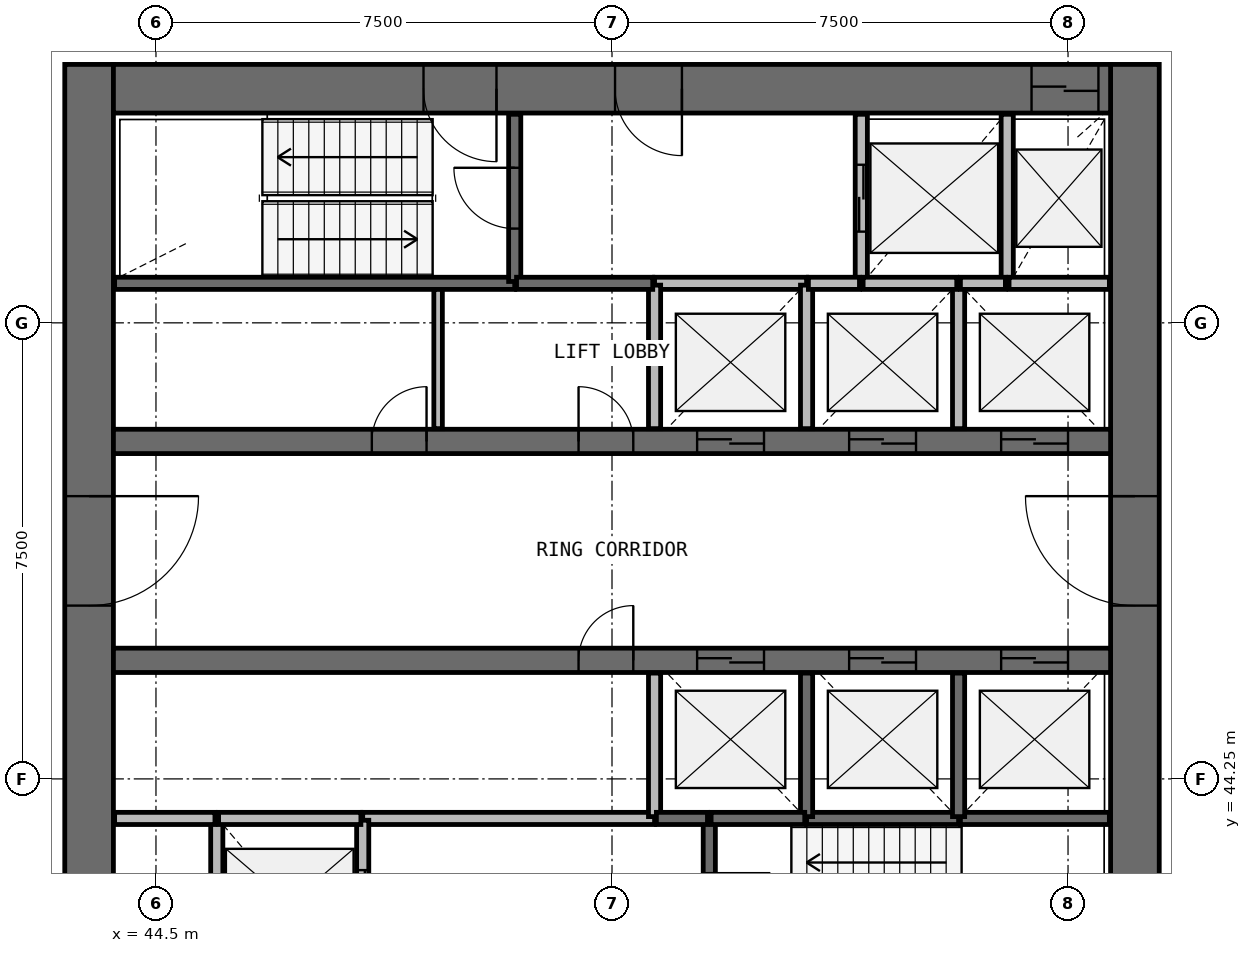
"""IFC4 building model, lengths in metres.
Left out: names, types, materials, properties, quantities, classifications, styles, units other than length and angle.
Written with IfcOpenShell. Run it as: python <this file> out.ifc"""

import sys

from ifc_helpers import new_model, si_unit, direction, frame, frame_2d, origin, place, context, subcontext, project, spatial, rectangle, extrude, source, transform, mapped, element, fill, save


model = new_model("IFC4")
c1 = context("Model", 3, precision=1e-05, world=origin(), true_north=direction((0.0, 1.0)))
c2 = subcontext(c1, "Body", "Model", "MODEL_VIEW")
j1 = project(units=[si_unit("LENGTHUNIT", "METRE"), si_unit("PLANEANGLEUNIT", "RADIAN")], contexts=[c1])
p1 = place(None, origin())
s1 = spatial("IfcSite", under=j1, at=p1, CompositionType="ELEMENT")
p2 = place(p1, origin())
s2 = spatial("IfcBuilding", under=s1, at=p2, CompositionType="ELEMENT")
p3 = place(p2, frame((0.0, 0.0, 140.9)))
s3 = spatial("IfcBuildingStorey", under=s2, at=p3, CompositionType="ELEMENT", Elevation=140.9)
p4 = place(p3, frame((60.6, 40.0, 0.0), z_axis=(0.0, 0.0, 1.0), x_axis=(0.0, 1.0, 0.0)))
e1 = element("IfcWall", 1, at=p4, inside=s3, PredefinedType="SHEAR", context=c2, shape_type="SweptSolid", body=[
    extrude(rectangle(XDim=16.0, YDim=0.8, at=frame_2d((8.0, 0.0))), origin(), (0.0, 0.0, 1.0), 3.9),
])
p5 = place(p4, frame((7.1, 0.0, 0.0)))
e2 = element("IfcOpeningElement", 2, at=p5, cuts=e1, PredefinedType="OPENING", context=c2, shape_type="SweptSolid", body=[
    extrude(rectangle(XDim=1.8, YDim=2.1, at=frame_2d((0.9, 1.05))), frame((0.0, 0.41, 0.0), z_axis=(0.0, -1.0, 0.0), x_axis=(1.0, 0.0, 0.0)), (0.0, 0.0, 1.0), 0.82),
])
p6 = place(p3, frame((43.4, 56.0, 0.0), z_axis=(0.0, 0.0, 1.0), x_axis=(0.0, -1.0, 0.0)))
e3 = element("IfcWall", 3, at=p6, inside=s3, PredefinedType="SHEAR", context=c2, shape_type="SweptSolid", body=[
    extrude(rectangle(XDim=16.0, YDim=0.8, at=frame_2d((8.0, 0.0))), origin(), (0.0, 0.0, 1.0), 3.9),
])
p7 = place(p6, frame((7.1, 0.0, 0.0)))
e4 = element("IfcOpeningElement", 4, at=p7, cuts=e3, PredefinedType="OPENING", context=c2, shape_type="SweptSolid", body=[
    extrude(rectangle(XDim=1.8, YDim=2.1, at=frame_2d((0.9, 1.05))), frame((0.0, 0.41, 0.0), z_axis=(0.0, -1.0, 0.0), x_axis=(1.0, 0.0, 0.0)), (0.0, 0.0, 1.0), 0.82),
])
p8 = place(p3, frame((60.2, 55.6, 0.0), z_axis=(0.0, 0.0, 1.0), x_axis=(-1.0, 0.0, 0.0)))
e5 = element("IfcWall", 5, at=p8, inside=s3, PredefinedType="SHEAR", context=c2, shape_type="SweptSolid", body=[
    extrude(rectangle(XDim=16.4, YDim=0.8, at=frame_2d((8.2, 0.0))), origin(), (0.0, 0.0, 1.0), 3.9),
])
p9 = place(p8, frame((0.2, 0.0, 0.0)))
e6 = element("IfcOpeningElement", 6, at=p9, cuts=e5, PredefinedType="OPENING", context=c2, shape_type="SweptSolid", body=[
    extrude(rectangle(XDim=1.1, YDim=2.1, at=frame_2d((0.55, 1.05))), frame((0.0, 0.41, 0.0), z_axis=(0.0, -1.0, 0.0), x_axis=(1.0, 0.0, 0.0)), (0.0, 0.0, 1.0), 0.82),
])
p10 = place(p8, frame((10.1, 0.0, 0.0)))
e7 = element("IfcOpeningElement", 7, at=p10, cuts=e5, PredefinedType="OPENING", context=c2, shape_type="SweptSolid", body=[
    extrude(rectangle(XDim=1.2, YDim=2.1, at=frame_2d((0.6, 1.05))), frame((0.0, 0.41, 0.0), z_axis=(0.0, -1.0, 0.0), x_axis=(1.0, 0.0, 0.0)), (0.0, 0.0, 1.0), 0.82),
])
p11 = place(p8, frame((7.05, 0.0, 0.0)))
e8 = element("IfcOpeningElement", 8, at=p11, cuts=e5, PredefinedType="OPENING", context=c2, shape_type="SweptSolid", body=[
    extrude(rectangle(XDim=1.1, YDim=2.1, at=frame_2d((0.55, 1.05))), frame((0.0, 0.41, 0.0), z_axis=(0.0, -1.0, 0.0), x_axis=(1.0, 0.0, 0.0)), (0.0, 0.0, 1.0), 0.82),
])
p12 = place(p3, frame((43.8, 49.8, 0.0), z_axis=(0.0, 0.0, 1.0), x_axis=(1.0, 0.0, 0.0)))
e9 = element("IfcWall", 9, at=p12, inside=s3, PredefinedType="SHEAR", context=c2, shape_type="SweptSolid", body=[
    extrude(rectangle(XDim=16.4, YDim=0.4, at=frame_2d((8.2, 0.0))), origin(), (0.0, 0.0, 1.0), 3.9),
])
p13 = place(p12, frame((9.6, 0.0, 0.0)))
e10 = element("IfcOpeningElement", 10, at=p13, cuts=e9, PredefinedType="OPENING", context=c2, shape_type="SweptSolid", body=[
    extrude(rectangle(XDim=1.1, YDim=2.1, at=frame_2d((0.55, 1.05))), frame((0.0, 0.21, 0.0), z_axis=(0.0, -1.0, 0.0), x_axis=(1.0, 0.0, 0.0)), (0.0, 0.0, 1.0), 0.42),
])
p14 = place(p12, frame((12.1, 0.0, 0.0)))
e11 = element("IfcOpeningElement", 11, at=p14, cuts=e9, PredefinedType="OPENING", context=c2, shape_type="SweptSolid", body=[
    extrude(rectangle(XDim=1.1, YDim=2.1, at=frame_2d((0.55, 1.05))), frame((0.0, 0.21, 0.0), z_axis=(0.0, -1.0, 0.0), x_axis=(1.0, 0.0, 0.0)), (0.0, 0.0, 1.0), 0.42),
])
p15 = place(p12, frame((14.6, 0.0, 0.0)))
e12 = element("IfcOpeningElement", 12, at=p15, cuts=e9, PredefinedType="OPENING", context=c2, shape_type="SweptSolid", body=[
    extrude(rectangle(XDim=1.1, YDim=2.1, at=frame_2d((0.55, 1.05))), frame((0.0, 0.21, 0.0), z_axis=(0.0, -1.0, 0.0), x_axis=(1.0, 0.0, 0.0)), (0.0, 0.0, 1.0), 0.42),
])
p16 = place(p12, frame((4.25, 0.0, 0.0)))
e13 = element("IfcOpeningElement", 13, at=p16, cuts=e9, PredefinedType="OPENING", context=c2, shape_type="SweptSolid", body=[
    extrude(rectangle(XDim=0.9, YDim=2.1, at=frame_2d((0.45, 1.05))), frame((0.0, 0.21, 0.0), z_axis=(0.0, -1.0, 0.0), x_axis=(1.0, 0.0, 0.0)), (0.0, 0.0, 1.0), 0.42),
])
p17 = place(p12, frame((7.65, 0.0, 0.0)))
e14 = element("IfcOpeningElement", 14, at=p17, cuts=e9, PredefinedType="OPENING", context=c2, shape_type="SweptSolid", body=[
    extrude(rectangle(XDim=0.9, YDim=2.1, at=frame_2d((0.45, 1.05))), frame((0.0, 0.21, 0.0), z_axis=(0.0, -1.0, 0.0), x_axis=(1.0, 0.0, 0.0)), (0.0, 0.0, 1.0), 0.42),
])
p18 = place(p3, frame((43.8, 46.2, 0.0), z_axis=(0.0, 0.0, 1.0), x_axis=(1.0, 0.0, 0.0)))
e15 = element("IfcWall", 15, at=p18, inside=s3, PredefinedType="SHEAR", context=c2, shape_type="SweptSolid", body=[
    extrude(rectangle(XDim=16.4, YDim=0.4, at=frame_2d((8.2, 0.0))), origin(), (0.0, 0.0, 1.0), 3.9),
])
p19 = place(p18, frame((9.6, 0.0, 0.0)))
e16 = element("IfcOpeningElement", 16, at=p19, cuts=e15, PredefinedType="OPENING", context=c2, shape_type="SweptSolid", body=[
    extrude(rectangle(XDim=1.1, YDim=2.1, at=frame_2d((0.55, 1.05))), frame((0.0, 0.21, 0.0), z_axis=(0.0, -1.0, 0.0), x_axis=(1.0, 0.0, 0.0)), (0.0, 0.0, 1.0), 0.42),
])
p20 = place(p18, frame((12.1, 0.0, 0.0)))
e17 = element("IfcOpeningElement", 17, at=p20, cuts=e15, PredefinedType="OPENING", context=c2, shape_type="SweptSolid", body=[
    extrude(rectangle(XDim=1.1, YDim=2.1, at=frame_2d((0.55, 1.05))), frame((0.0, 0.21, 0.0), z_axis=(0.0, -1.0, 0.0), x_axis=(1.0, 0.0, 0.0)), (0.0, 0.0, 1.0), 0.42),
])
p21 = place(p18, frame((14.6, 0.0, 0.0)))
e18 = element("IfcOpeningElement", 18, at=p21, cuts=e15, PredefinedType="OPENING", context=c2, shape_type="SweptSolid", body=[
    extrude(rectangle(XDim=1.1, YDim=2.1, at=frame_2d((0.55, 1.05))), frame((0.0, 0.21, 0.0), z_axis=(0.0, -1.0, 0.0), x_axis=(1.0, 0.0, 0.0)), (0.0, 0.0, 1.0), 0.42),
])
p22 = place(p18, frame((7.65, 0.0, 0.0)))
e19 = element("IfcOpeningElement", 19, at=p22, cuts=e15, PredefinedType="OPENING", context=c2, shape_type="SweptSolid", body=[
    extrude(rectangle(XDim=0.9, YDim=2.1, at=frame_2d((0.45, 1.05))), frame((0.0, 0.21, 0.0), z_axis=(0.0, -1.0, 0.0), x_axis=(1.0, 0.0, 0.0)), (0.0, 0.0, 1.0), 0.42),
])
p23 = place(p3, frame((43.82, 52.4, 0.0), z_axis=(0.0, 0.0, 1.0), x_axis=(1.0, 0.0, 0.0)))
e20 = element("IfcWall", 20, at=p23, inside=s3, PredefinedType="SOLIDWALL", context=c2, shape_type="SweptSolid", body=[
    extrude(rectangle(XDim=6.58, YDim=0.2, at=frame_2d((3.29, 0.0))), origin(), (0.0, 0.0, 1.0), 3.58),
])
p24 = place(p3, frame((52.7, 43.6, 0.0), z_axis=(0.0, 0.0, 1.0), x_axis=(-1.0, 0.0, 0.0)))
e21 = element("IfcWall", 21, at=p24, inside=s3, PredefinedType="SOLIDWALL", context=c2, shape_type="SweptSolid", body=[
    extrude(rectangle(XDim=4.8, YDim=0.2, at=frame_2d((2.4, 0.0))), origin(), (0.0, 0.0, 1.0), 3.58),
])
p25 = place(p3, frame((45.5, 43.6, 0.0), z_axis=(0.0, 0.0, 1.0), x_axis=(0.0, -1.0, 0.0)))
e22 = element("IfcWall", 22, at=p25, inside=s3, PredefinedType="SOLIDWALL", context=c2, shape_type="SweptSolid", body=[
    extrude(rectangle(XDim=2.78, YDim=0.2, at=frame_2d((1.39, 0.0))), origin(), (0.0, 0.0, 1.0), 3.58),
])
p26 = place(p3, frame((47.9, 40.82, 0.0), z_axis=(0.0, 0.0, 1.0), x_axis=(0.0, 1.0, 0.0)))
e23 = element("IfcWall", 23, at=p26, inside=s3, PredefinedType="SOLIDWALL", context=c2, shape_type="SweptSolid", body=[
    extrude(rectangle(XDim=2.75, YDim=0.2, at=frame_2d((1.375, 0.0))), origin(), (0.0, 0.0, 1.0), 3.58),
])
p27 = place(p26, frame((0.83, 0.0, 0.0)))
e24 = element("IfcOpeningElement", 24, at=p27, cuts=e23, PredefinedType="OPENING", context=c2, shape_type="SweptSolid", body=[
    extrude(rectangle(XDim=1.1, YDim=2.1, at=frame_2d((0.55, 1.05))), frame((0.0, 0.11, 0.0), z_axis=(0.0, -1.0, 0.0), x_axis=(1.0, 0.0, 0.0)), (0.0, 0.0, 1.0), 0.22),
])
p28 = place(p3, frame((50.4, 52.43, 0.0), z_axis=(0.0, 0.0, 1.0), x_axis=(0.0, 1.0, 0.0)))
e25 = element("IfcWall", 25, at=p28, inside=s3, PredefinedType="SOLIDWALL", context=c2, shape_type="SweptSolid", body=[
    extrude(rectangle(XDim=2.75, YDim=0.2, at=frame_2d((1.375, 0.0))), origin(), (0.0, 0.0, 1.0), 3.58),
])
p29 = place(p28, frame((0.87, 0.0, 0.0)))
e26 = element("IfcOpeningElement", 26, at=p29, cuts=e25, PredefinedType="OPENING", context=c2, shape_type="SweptSolid", body=[
    extrude(rectangle(XDim=1.0, YDim=2.1, at=frame_2d((0.5, 1.05))), frame((0.0, 0.11, 0.0), z_axis=(0.0, -1.0, 0.0), x_axis=(1.0, 0.0, 0.0)), (0.0, 0.0, 1.0), 0.22),
])
p30 = place(p3, frame((53.6, 43.6, 0.0), z_axis=(0.0, 0.0, 1.0), x_axis=(0.0, -1.0, 0.0)))
e27 = element("IfcWall", 27, at=p30, inside=s3, PredefinedType="SOLIDWALL", context=c2, shape_type="SweptSolid", body=[
    extrude(rectangle(XDim=2.78, YDim=0.2, at=frame_2d((1.39, 0.0))), origin(), (0.0, 0.0, 1.0), 3.58),
])
p31 = place(p30, frame((0.9, 0.0, 0.0)))
e28 = element("IfcOpeningElement", 28, at=p31, cuts=e27, PredefinedType="OPENING", context=c2, shape_type="SweptSolid", body=[
    extrude(rectangle(XDim=1.0, YDim=2.1, at=frame_2d((0.5, 1.05))), frame((0.0, 0.11, 0.0), z_axis=(0.0, -1.0, 0.0), x_axis=(1.0, 0.0, 0.0)), (0.0, 0.0, 1.0), 0.22),
])
p32 = place(p3, frame((56.1, 55.18, 0.0), z_axis=(0.0, 0.0, 1.0), x_axis=(0.0, -1.0, 0.0)))
e29 = element("IfcWall", 29, at=p32, inside=s3, PredefinedType="SOLIDWALL", context=c2, shape_type="SweptSolid", body=[
    extrude(rectangle(XDim=2.78, YDim=0.2, at=frame_2d((1.39, 0.0))), origin(), (0.0, 0.0, 1.0), 3.58),
])
p33 = place(p32, frame((0.83, 0.0, 0.0)))
e30 = element("IfcOpeningElement", 30, at=p33, cuts=e29, PredefinedType="OPENING", context=c2, shape_type="SweptSolid", body=[
    extrude(rectangle(XDim=1.1, YDim=2.1, at=frame_2d((0.55, 1.05))), frame((0.0, 0.11, 0.0), z_axis=(0.0, -1.0, 0.0), x_axis=(1.0, 0.0, 0.0)), (0.0, 0.0, 1.0), 0.22),
])
p34 = place(p3, frame((58.5, 52.4, 0.0), z_axis=(0.0, 0.0, 1.0), x_axis=(0.0, 1.0, 0.0)))
e31 = element("IfcWall", 31, at=p34, inside=s3, PredefinedType="SOLIDWALL", context=c2, shape_type="SweptSolid", body=[
    extrude(rectangle(XDim=2.78, YDim=0.2, at=frame_2d((1.39, 0.0))), origin(), (0.0, 0.0, 1.0), 3.58),
])
for number, where, z_axis, x_axis in (
    (32, (55.2, 52.4, 0.0), (0.0, 0.0, 1.0), (-1.0, 0.0, 0.0)),
    (33, (55.2, 43.6, 0.0), (0.0, 0.0, 1.0), (1.0, 0.0, 0.0)),
):
    element("IfcWall", number, at=place(p3, frame(where, z_axis=z_axis, x_axis=x_axis)), inside=s3, PredefinedType="SOLIDWALL", context=c2, shape_type="SweptSolid", body=[
        extrude(rectangle(XDim=2.5, YDim=0.2, at=frame_2d((1.25, 0.0))), origin(), (0.0, 0.0, 1.0), 3.58),
    ])
p35 = place(p3, frame((57.73, 43.6, 0.0), z_axis=(0.0, 0.0, 1.0), x_axis=(1.0, 0.0, 0.0)))
e34 = element("IfcWall", 34, at=p35, inside=s3, PredefinedType="SOLIDWALL", context=c2, shape_type="SweptSolid", body=[
    extrude(rectangle(XDim=2.45, YDim=0.2, at=frame_2d((1.225, 0.0))), origin(), (0.0, 0.0, 1.0), 3.58),
])
p36 = place(p3, frame((47.87, 43.6, 0.0), z_axis=(0.0, 0.0, 1.0), x_axis=(-1.0, 0.0, 0.0)))
e35 = element("IfcWall", 35, at=p36, inside=s3, PredefinedType="SOLIDWALL", context=c2, shape_type="SweptSolid", body=[
    extrude(rectangle(XDim=2.34, YDim=0.2, at=frame_2d((1.17, 0.0))), origin(), (0.0, 0.0, 1.0), 3.58),
])
for number, where, z_axis, x_axis in (
    (36, (52.7, 45.99, 0.0), (0.0, 0.0, 1.0), (0.0, -1.0, 0.0)),
    (37, (52.7, 52.37, 0.0), (0.0, 0.0, 1.0), (0.0, -1.0, 0.0)),
    (38, (55.2, 43.63, 0.0), (0.0, 0.0, 1.0), (0.0, 1.0, 0.0)),
    (39, (55.2, 50.01, 0.0), (0.0, 0.0, 1.0), (0.0, 1.0, 0.0)),
    (40, (57.7, 43.63, 0.0), (0.0, 0.0, 1.0), (0.0, 1.0, 0.0)),
):
    element("IfcWall", number, at=place(p3, frame(where, z_axis=z_axis, x_axis=x_axis)), inside=s3, PredefinedType="SOLIDWALL", context=c2, shape_type="SweptSolid", body=[
        extrude(rectangle(XDim=2.36, YDim=0.2, at=frame_2d((1.18, 0.0))), origin(), (0.0, 0.0, 1.0), 3.58),
    ])
p37 = place(p3, frame((57.7, 50.01, 0.0), z_axis=(0.0, 0.0, 1.0), x_axis=(0.0, 1.0, 0.0)))
e41 = element("IfcWall", 41, at=p37, inside=s3, PredefinedType="SOLIDWALL", context=c2, shape_type="SweptSolid", body=[
    extrude(rectangle(XDim=2.39, YDim=0.2, at=frame_2d((1.195, 0.0))), origin(), (0.0, 0.0, 1.0), 3.58),
])
p38 = place(p3, frame((50.43, 52.4, 0.0), z_axis=(0.0, 0.0, 1.0), x_axis=(1.0, 0.0, 0.0)))
e42 = element("IfcWall", 42, at=p38, inside=s3, PredefinedType="SOLIDWALL", context=c2, shape_type="SweptSolid", body=[
    extrude(rectangle(XDim=2.24, YDim=0.2, at=frame_2d((1.12, 0.0))), origin(), (0.0, 0.0, 1.0), 3.58),
])
for number, where, z_axis, x_axis in (
    (43, (45.47, 43.6, 0.0), (0.0, 0.0, 1.0), (-1.0, 0.0, 0.0)),
    (44, (60.18, 52.4, 0.0), (0.0, 0.0, 1.0), (-1.0, 0.0, 0.0)),
):
    element("IfcWall", number, at=place(p3, frame(where, z_axis=z_axis, x_axis=x_axis)), inside=s3, PredefinedType="SOLIDWALL", context=c2, shape_type="SweptSolid", body=[
        extrude(rectangle(XDim=1.65, YDim=0.2, at=frame_2d((0.825, 0.0))), origin(), (0.0, 0.0, 1.0), 3.58),
    ])
for number, where, z_axis, x_axis in (
    (45, (53.63, 43.6, 0.0), (0.0, 0.0, 1.0), (1.0, 0.0, 0.0)),
    (46, (57.67, 52.4, 0.0), (0.0, 0.0, 1.0), (-1.0, 0.0, 0.0)),
):
    element("IfcWall", number, at=place(p3, frame(where, z_axis=z_axis, x_axis=x_axis)), inside=s3, PredefinedType="SOLIDWALL", context=c2, shape_type="SweptSolid", body=[
        extrude(rectangle(XDim=1.54, YDim=0.2, at=frame_2d((0.77, 0.0))), origin(), (0.0, 0.0, 1.0), 3.58),
    ])
for number, where, z_axis, x_axis in (
    (47, (52.73, 43.6, 0.0), (0.0, 0.0, 1.0), (1.0, 0.0, 0.0)),
    (48, (56.07, 52.4, 0.0), (0.0, 0.0, 1.0), (-1.0, 0.0, 0.0)),
):
    element("IfcWall", number, at=place(p3, frame(where, z_axis=z_axis, x_axis=x_axis)), inside=s3, PredefinedType="SOLIDWALL", context=c2, shape_type="SweptSolid", body=[
        extrude(rectangle(XDim=0.84, YDim=0.2, at=frame_2d((0.42, 0.0))), origin(), (0.0, 0.0, 1.0), 3.58),
    ])
p39 = place(p3, frame((58.47, 52.4, 0.0), z_axis=(0.0, 0.0, 1.0), x_axis=(-1.0, 0.0, 0.0)))
e49 = element("IfcWall", 49, at=p39, inside=s3, PredefinedType="SOLIDWALL", context=c2, shape_type="SweptSolid", body=[
    extrude(rectangle(XDim=0.74, YDim=0.2, at=frame_2d((0.37, 0.0))), origin(), (0.0, 0.0, 1.0), 3.58),
])
p40 = place(p3, frame((49.14, 50.01, 0.0), z_axis=(0.0, 0.0, 1.0), x_axis=(0.0, 1.0, 0.0)))
e50 = element("IfcWall", 50, at=p40, inside=s3, PredefinedType="PARTITIONING", context=c2, shape_type="SweptSolid", body=[
    extrude(rectangle(XDim=2.29, YDim=0.14, at=frame_2d((1.145, 0.0))), origin(), (0.0, 0.0, 1.0), 2.88),
])
m1 = source(origin(), c2, "Body", "SweptSolid", [
    extrude(rectangle(XDim=1.8, YDim=2.1, at=frame_2d((0.9, 1.05))), frame((0.0, 0.025, 0.0), z_axis=(0.0, -1.0, 0.0), x_axis=(1.0, 0.0, 0.0)), (0.0, 0.0, 1.0), 0.05),
])
p41 = place(p7, origin())
e51 = element("IfcDoor", 51, at=p41, inside=s3, OperationType="SINGLE_SWING_LEFT", PredefinedType="DOOR", context=c2, shape_type="MappedRepresentation", body=[
    mapped(m1, transform((0.0, 0.0, 0.0), scale=1.0)),
])
fill(e4, e51)
p42 = place(p5, origin())
e52 = element("IfcDoor", 52, at=p42, inside=s3, OperationType="SINGLE_SWING_RIGHT", PredefinedType="DOOR", context=c2, shape_type="MappedRepresentation", body=[
    mapped(m1, transform((0.0, 0.0, 0.0), scale=1.0)),
])
fill(e2, e52)
m2 = source(origin(), c2, "Body", "SweptSolid", [
    extrude(rectangle(XDim=1.1, YDim=2.1, at=frame_2d((0.55, 1.05))), frame((0.0, 0.025, 0.0), z_axis=(0.0, -1.0, 0.0), x_axis=(1.0, 0.0, 0.0)), (0.0, 0.0, 1.0), 0.05),
])
p43 = place(p13, origin())
e53 = element("IfcDoor", 53, at=p43, inside=s3, OperationType="DOUBLE_DOOR_SLIDING", PredefinedType="USERDEFINED", context=c2, shape_type="MappedRepresentation", body=[
    mapped(m2, transform((0.0, 0.0, 0.0), scale=1.0)),
])
fill(e10, e53)
p44 = place(p14, origin())
e54 = element("IfcDoor", 54, at=p44, inside=s3, OperationType="DOUBLE_DOOR_SLIDING", PredefinedType="USERDEFINED", context=c2, shape_type="MappedRepresentation", body=[
    mapped(m2, transform((0.0, 0.0, 0.0), scale=1.0)),
])
fill(e11, e54)
p45 = place(p15, origin())
e55 = element("IfcDoor", 55, at=p45, inside=s3, OperationType="DOUBLE_DOOR_SLIDING", PredefinedType="USERDEFINED", context=c2, shape_type="MappedRepresentation", body=[
    mapped(m2, transform((0.0, 0.0, 0.0), scale=1.0)),
])
fill(e12, e55)
p46 = place(p19, origin())
e56 = element("IfcDoor", 56, at=p46, inside=s3, OperationType="DOUBLE_DOOR_SLIDING", PredefinedType="USERDEFINED", context=c2, shape_type="MappedRepresentation", body=[
    mapped(m2, transform((0.0, 0.0, 0.0), scale=1.0)),
])
fill(e16, e56)
p47 = place(p20, origin())
e57 = element("IfcDoor", 57, at=p47, inside=s3, OperationType="DOUBLE_DOOR_SLIDING", PredefinedType="USERDEFINED", context=c2, shape_type="MappedRepresentation", body=[
    mapped(m2, transform((0.0, 0.0, 0.0), scale=1.0)),
])
fill(e17, e57)
p48 = place(p21, origin())
e58 = element("IfcDoor", 58, at=p48, inside=s3, OperationType="DOUBLE_DOOR_SLIDING", PredefinedType="USERDEFINED", context=c2, shape_type="MappedRepresentation", body=[
    mapped(m2, transform((0.0, 0.0, 0.0), scale=1.0)),
])
fill(e18, e58)
p49 = place(p33, origin())
e59 = element("IfcDoor", 59, at=p49, inside=s3, OperationType="DOUBLE_DOOR_SLIDING", PredefinedType="USERDEFINED", context=c2, shape_type="MappedRepresentation", body=[
    mapped(m2, transform((0.0, 0.0, 0.0), scale=1.0)),
])
fill(e30, e59)
p50 = place(p27, origin())
e60 = element("IfcDoor", 60, at=p50, inside=s3, OperationType="DOUBLE_DOOR_SLIDING", PredefinedType="USERDEFINED", context=c2, shape_type="MappedRepresentation", body=[
    mapped(m2, transform((0.0, 0.0, 0.0), scale=1.0)),
])
fill(e24, e60)
p51 = place(p9, origin())
e61 = element("IfcDoor", 61, at=p51, inside=s3, OperationType="DOUBLE_DOOR_SLIDING", PredefinedType="USERDEFINED", context=c2, shape_type="MappedRepresentation", body=[
    mapped(m2, transform((0.0, 0.0, 0.0), scale=1.0)),
])
fill(e6, e61)
m3 = source(origin(), c2, "Body", "SweptSolid", [
    extrude(rectangle(XDim=1.2, YDim=2.1, at=frame_2d((0.6, 1.05))), frame((0.0, 0.025, 0.0), z_axis=(0.0, -1.0, 0.0), x_axis=(1.0, 0.0, 0.0)), (0.0, 0.0, 1.0), 0.05),
])
p52 = place(p10, origin())
e62 = element("IfcDoor", 62, at=p52, inside=s3, OperationType="SINGLE_SWING_LEFT", PredefinedType="DOOR", context=c2, shape_type="MappedRepresentation", body=[
    mapped(m3, transform((0.0, 0.0, 0.0), scale=1.0)),
])
fill(e7, e62)
m4 = source(origin(), c2, "Body", "SweptSolid", [
    extrude(rectangle(XDim=1.0, YDim=2.1, at=frame_2d((0.5, 1.05))), frame((0.0, 0.025, 0.0), z_axis=(0.0, -1.0, 0.0), x_axis=(1.0, 0.0, 0.0)), (0.0, 0.0, 1.0), 0.05),
])
p53 = place(p29, origin())
e63 = element("IfcDoor", 63, at=p53, inside=s3, OperationType="SINGLE_SWING_RIGHT", PredefinedType="DOOR", context=c2, shape_type="MappedRepresentation", body=[
    mapped(m4, transform((0.0, 0.0, 0.0), scale=1.0)),
])
fill(e26, e63)
m5 = source(origin(), c2, "Body", "SweptSolid", [
    extrude(rectangle(XDim=1.1, YDim=2.1, at=frame_2d((0.55, 1.05))), frame((0.0, 0.025, 0.0), z_axis=(0.0, -1.0, 0.0), x_axis=(1.0, 0.0, 0.0)), (0.0, 0.0, 1.0), 0.05),
])
p54 = place(p11, origin())
e64 = element("IfcDoor", 64, at=p54, inside=s3, OperationType="SINGLE_SWING_LEFT", PredefinedType="DOOR", context=c2, shape_type="MappedRepresentation", body=[
    mapped(m5, transform((0.0, 0.0, 0.0), scale=1.0)),
])
fill(e8, e64)
m6 = source(origin(), c2, "Body", "SweptSolid", [
    extrude(rectangle(XDim=0.9, YDim=2.1, at=frame_2d((0.45, 1.05))), frame((0.0, 0.025, 0.0), z_axis=(0.0, -1.0, 0.0), x_axis=(1.0, 0.0, 0.0)), (0.0, 0.0, 1.0), 0.05),
])
p55 = place(p16, origin())
e65 = element("IfcDoor", 65, at=p55, inside=s3, OperationType="SINGLE_SWING_RIGHT", PredefinedType="DOOR", context=c2, shape_type="MappedRepresentation", body=[
    mapped(m6, transform((0.0, 0.0, 0.0), scale=1.0)),
])
fill(e13, e65)
p56 = place(p17, origin())
e66 = element("IfcDoor", 66, at=p56, inside=s3, OperationType="SINGLE_SWING_LEFT", PredefinedType="DOOR", context=c2, shape_type="MappedRepresentation", body=[
    mapped(m6, transform((0.0, 0.0, 0.0), scale=1.0)),
])
fill(e14, e66)
p57 = place(p22, origin())
e67 = element("IfcDoor", 67, at=p57, inside=s3, OperationType="SINGLE_SWING_RIGHT", PredefinedType="DOOR", context=c2, shape_type="MappedRepresentation", body=[
    mapped(m6, transform((0.0, 0.0, 0.0), scale=1.0)),
])
fill(e19, e67)
save(model, sys.argv[1])
